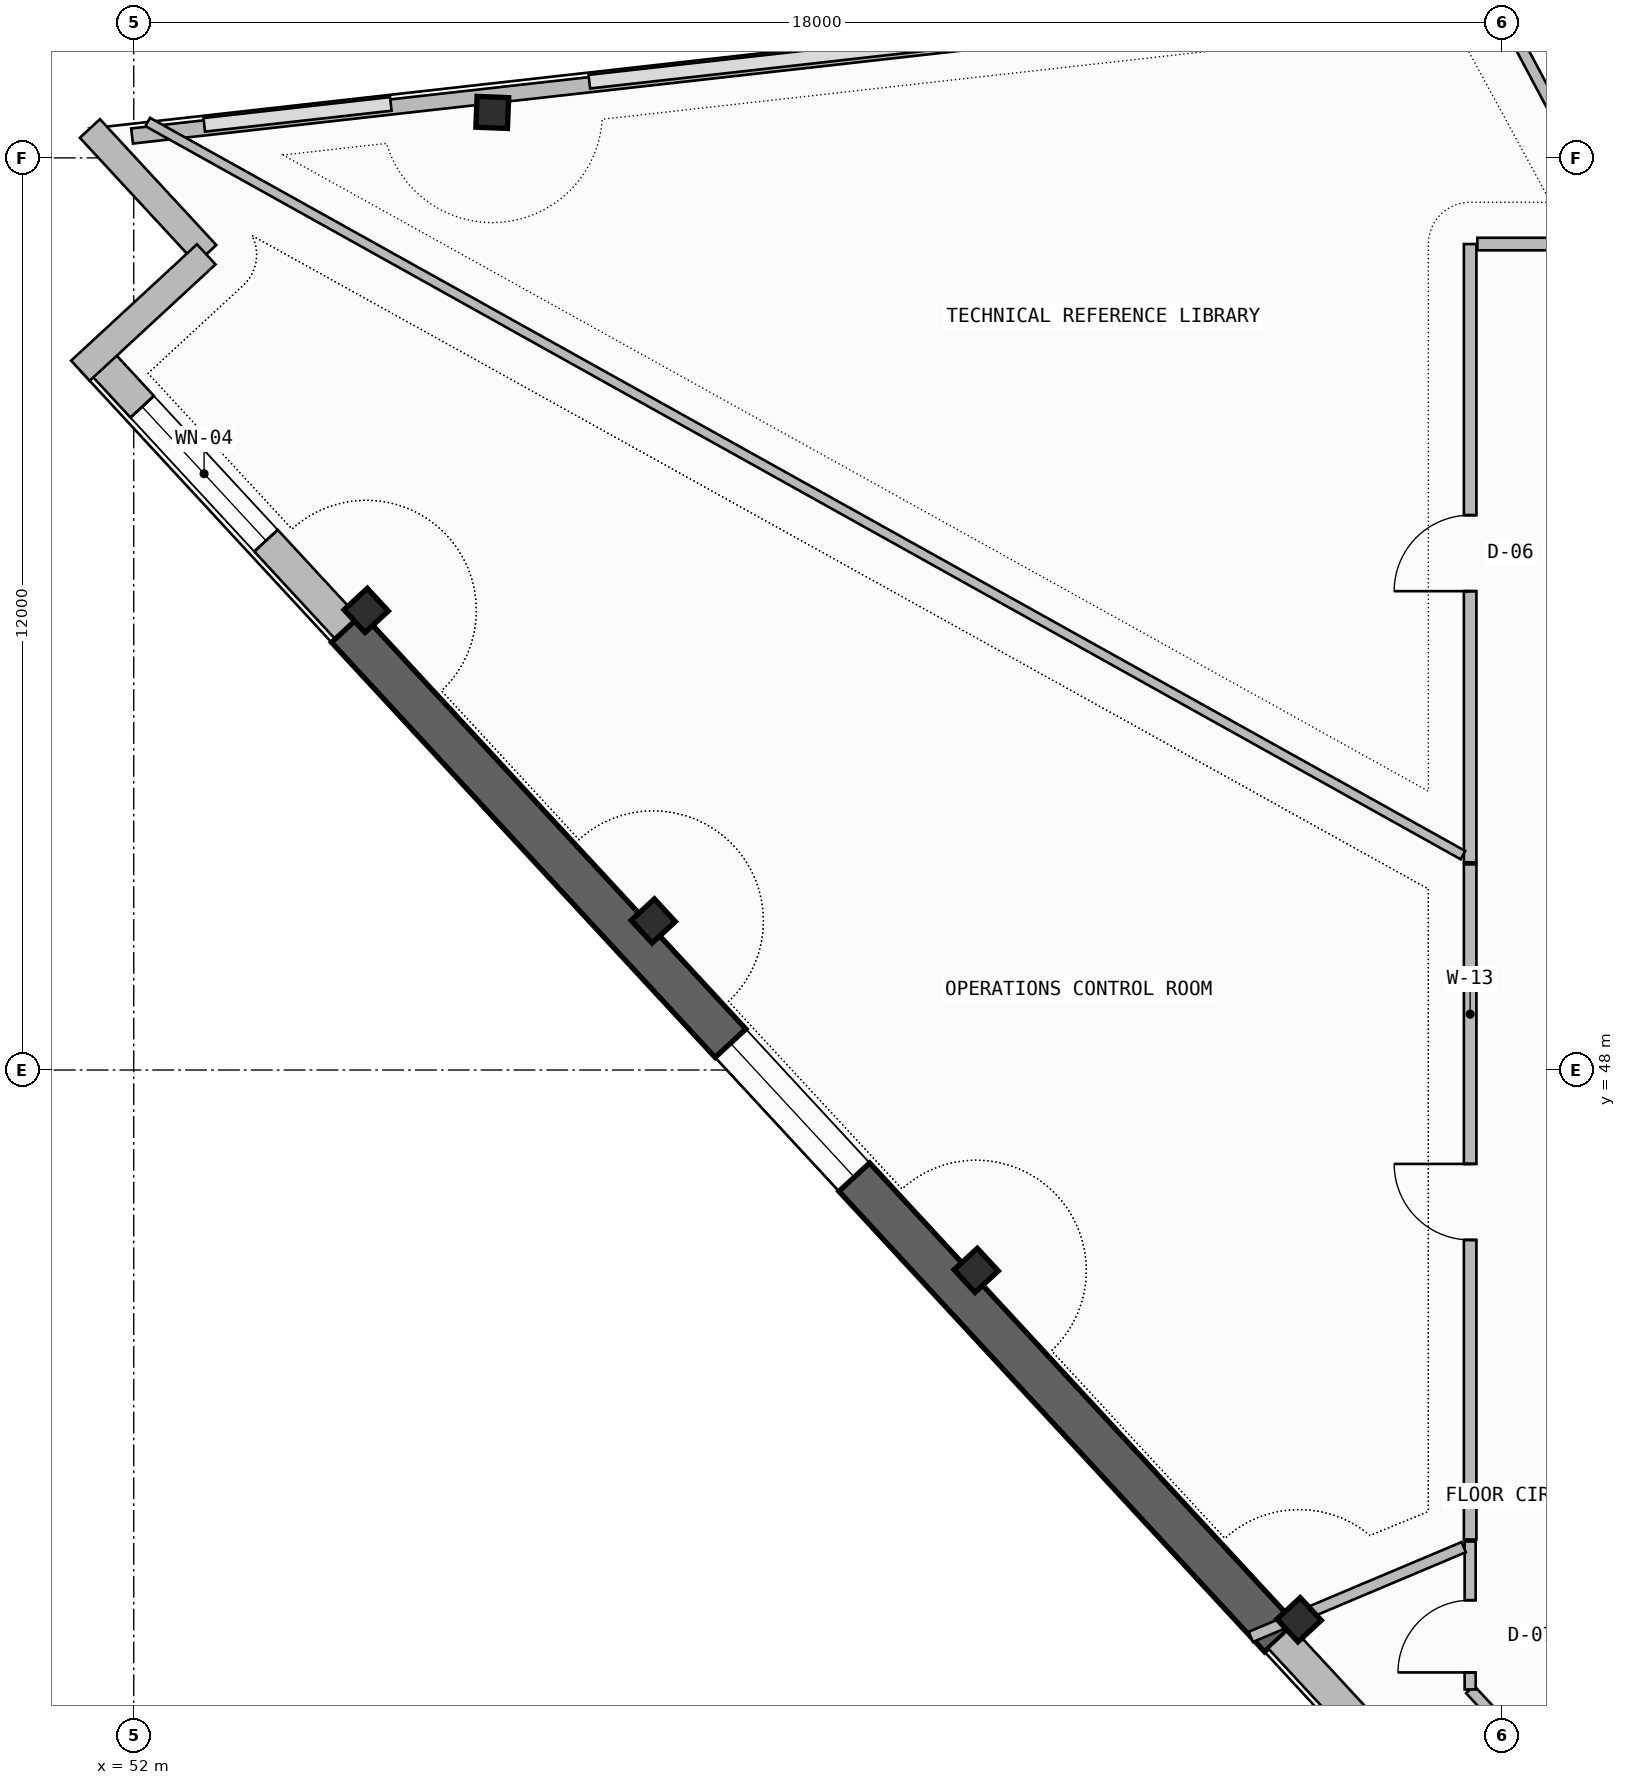
"""IFC4 building model, lengths in metres.
Left out: names, types, materials, properties, quantities, classifications, styles, units other than length and angle.
Written with IfcOpenShell. Run it as: python <this file> out.ifc"""

import sys

from ifc_helpers import new_model, si_unit, direction, frame, frame_2d, origin, origin_2d, place, context, subcontext, project, spatial, rectangle, i_section, extrude, element, fill, save


model = new_model("IFC4")
c1 = context("Model", 3, precision=1e-05, world=origin(), true_north=direction((0.0, 1.0)))
c2 = subcontext(c1, "Body", "Model", "MODEL_VIEW")
j1 = project(units=[si_unit("LENGTHUNIT", "METRE"), si_unit("PLANEANGLEUNIT", "RADIAN")], contexts=[c1])
p1 = place(None, origin())
s1 = spatial("IfcSite", under=j1, at=p1, CompositionType="ELEMENT")
p2 = place(p1, origin())
s2 = spatial("IfcBuilding", under=s1, at=p2, CompositionType="ELEMENT")
p3 = place(p2, frame((0.0, 0.0, 292.42)))
s3 = spatial("IfcBuildingStorey", under=s2, at=p3, CompositionType="ELEMENT", Elevation=292.42)
for number, where, z_axis, x_axis in (
    (1, (56.717, 60.598, 0.0), (0.0, 0.0, 1.0), (0.039, 0.999, 0.0)),
    (2, (55.058, 54.046, 0.0), (0.0, 0.0, 1.0), (-0.679, 0.734, 0.0)),
    (3, (58.835, 49.961, 0.0), (0.0, 0.0, 1.0), (-0.679, 0.734, 0.0)),
    (4, (63.084, 45.364, 0.0), (0.0, 0.0, 1.0), (-0.679, 0.734, 0.0)),
    (5, (67.333, 40.768, 0.0), (0.0, 0.0, 1.0), (-0.679, 0.734, 0.0)),
):
    element("IfcColumn", number, at=place(p3, frame(where, z_axis=z_axis, x_axis=x_axis)), inside=s3, PredefinedType="COLUMN", context=c2, shape_type="SweptSolid", body=[
        extrude(i_section(OverallWidth=0.406, OverallDepth=0.416, WebThickness=0.03, FlangeThickness=0.048, FilletRadius=0.015, at=origin_2d()), origin(), (0.0, 0.0, 1.0), 5.76),
    ])
p4 = place(p3, frame((51.5, 57.387, 0.0), z_axis=(0.0, 0.0, 1.0), x_axis=(0.67880684669, -0.734316869537, 0.0)))
e6 = element("IfcWall", 6, at=p4, inside=s3, PredefinedType="SOLIDWALL", context=c2, shape_type="SweptSolid", body=[
    extrude(rectangle(XDim=4.869, YDim=0.42, at=frame_2d((2.434, 0.0))), origin(), (0.0, 0.0, 1.0), 4.945),
])
p5 = place(p4, frame((0.9, 0.0, 1.1)))
e7 = element("IfcOpeningElement", 7, at=p5, cuts=e6, PredefinedType="OPENING", context=c2, shape_type="SweptSolid", body=[
    extrude(rectangle(XDim=2.4, YDim=1.2, at=frame_2d((1.2, 0.6))), frame((0.0, 0.22, 0.0), z_axis=(0.0, -1.0, 0.0), x_axis=(1.0, 0.0, 0.0)), (0.0, 0.0, 1.0), 0.44),
])
p6 = place(p3, frame((54.805, 53.812, -0.26), z_axis=(0.0, 0.0, 1.0), x_axis=(0.678803115619, -0.734320318543, 0.0)))
e8 = element("IfcWall", 8, at=p6, inside=s3, PredefinedType="SHEAR", context=c2, shape_type="SweptSolid", body=[
    extrude(rectangle(XDim=18.083, YDim=0.55, at=frame_2d((9.042, 0.0))), origin(), (0.0, 0.0, 1.0), 5.82),
])
p7 = place(p6, frame((7.434, 0.0, 1.1)))
e9 = element("IfcOpeningElement", 9, at=p7, cuts=e8, PredefinedType="OPENING", context=c2, shape_type="SweptSolid", body=[
    extrude(rectangle(XDim=2.4, YDim=1.2, at=frame_2d((1.2, 0.6))), frame((0.0, 0.285, 0.0), z_axis=(0.0, -1.0, 0.0), x_axis=(1.0, 0.0, 0.0)), (0.0, 0.0, 1.0), 0.57),
])
p8 = place(p3, frame((67.08, 40.533, 0.0), z_axis=(0.0, 0.0, 1.0), x_axis=(0.678800006437, -0.734323192648, 0.0)))
e10 = element("IfcWall", 10, at=p8, inside=s3, PredefinedType="SOLIDWALL", context=c2, shape_type="SweptSolid", body=[
    extrude(rectangle(XDim=6.512, YDim=0.42, at=frame_2d((3.256, 0.0))), origin(), (0.0, 0.0, 1.0), 4.945),
])
p9 = place(p8, frame((2.129, 0.0, 1.1)))
e11 = element("IfcOpeningElement", 11, at=p9, cuts=e10, PredefinedType="OPENING", context=c2, shape_type="SweptSolid", body=[
    extrude(rectangle(XDim=2.4, YDim=1.2, at=frame_2d((1.2, 0.6))), frame((0.0, 0.22, 0.0), z_axis=(0.0, -1.0, 0.0), x_axis=(1.0, 0.0, 0.0)), (0.0, 0.0, 1.0), 0.44),
])
for number, where, z_axis, x_axis in (
    (12, (51.423, 60.387, 0.0), (0.0, 0.0, 1.0), (0.679, -0.734, 0.0)),
    (13, (52.954, 58.731, 0.0), (0.0, 0.0, 1.0), (-0.734, -0.679, 0.0)),
):
    element("IfcWall", number, at=place(p3, frame(where, z_axis=z_axis, x_axis=x_axis)), inside=s3, PredefinedType="SOLIDWALL", context=c2, shape_type="SweptSolid", body=[
        extrude(rectangle(XDim=2.255, YDim=0.36, at=frame_2d((1.127, 0.0))), origin(), (0.0, 0.0, 1.0), 5.56),
    ])
p10 = place(p3, frame((81.557, 63.604, 0.0), z_axis=(0.0, 0.0, 1.0), x_axis=(-0.993775831398, -0.111398370403, 0.0)))
e14 = element("IfcWall", 14, at=p10, inside=s3, PredefinedType="PARAPET", context=c2, shape_type="SweptSolid", body=[
    extrude(rectangle(XDim=29.764, YDim=0.2, at=frame_2d((14.882, 0.0))), origin(), (0.0, 0.0, 1.0), 1.15),
])
p11 = place(p3, frame((69.583, 39.851, 0.0), z_axis=(0.0, 0.0, 1.0), x_axis=(0.678820916853, -0.734303862745, 0.0)))
e15 = element("IfcWall", 15, at=p11, inside=s3, PredefinedType="PARTITIONING", context=c2, shape_type="SweptSolid", body=[
    extrude(rectangle(XDim=2.455, YDim=0.145, at=frame_2d((1.228, 0.0))), origin(), (0.0, 0.0, 1.0), 5.56),
])
p12 = place(p3, frame((69.583, 41.798, 0.0), z_axis=(0.0, 0.0, 1.0), x_axis=(0.0, -1.0, 0.0)))
e16 = element("IfcWall", 16, at=p12, inside=s3, PredefinedType="PARTITIONING", context=c2, shape_type="SweptSolid", body=[
    extrude(rectangle(XDim=1.947, YDim=0.145, at=frame_2d((0.974, 0.0))), origin(), (0.0, 0.0, 1.0), 5.56),
])
p13 = place(p12, frame((0.773, 0.0, 0.0)))
e17 = element("IfcOpeningElement", 17, at=p13, cuts=e16, PredefinedType="OPENING", context=c2, shape_type="SweptSolid", body=[
    extrude(rectangle(XDim=0.95, YDim=2.15, at=frame_2d((0.475, 1.075))), frame((0.0, 0.083, 0.0), z_axis=(0.0, -1.0, 0.0), x_axis=(1.0, 0.0, 0.0)), (0.0, 0.0, 1.0), 0.165),
])
p14 = place(p3, frame((66.697, 40.542, 0.0), z_axis=(0.0, 0.0, 1.0), x_axis=(0.92147960716, 0.388426741598, 0.0)))
e18 = element("IfcWall", 18, at=p14, inside=s3, PredefinedType="PARTITIONING", context=c2, shape_type="SweptSolid", body=[
    extrude(rectangle(XDim=3.04, YDim=0.145, at=frame_2d((1.52, 0.0))), origin(), (0.0, 0.0, 1.0), 4.945),
])
p15 = place(p3, frame((71.589, 58.941, 0.0), z_axis=(0.0, 0.0, 1.0), x_axis=(-0.469769313207, 0.882789211742, 0.0)))
e19 = element("IfcWall", 19, at=p15, inside=s3, PredefinedType="PARTITIONING", context=c2, shape_type="SweptSolid", body=[
    extrude(rectangle(XDim=3.962, YDim=0.145, at=frame_2d((1.981, 0.0))), origin(), (0.0, 0.0, 1.0), 5.56),
])
p16 = place(p3, frame((69.583, 58.867, 0.0), z_axis=(0.0, 0.0, 1.0), x_axis=(0.0, -1.0, 0.0)))
e20 = element("IfcWall", 20, at=p16, inside=s3, PredefinedType="PARTITIONING", context=c2, shape_type="SweptSolid", body=[
    extrude(rectangle(XDim=8.134, YDim=0.165, at=frame_2d((4.067, 0.0))), origin(), (0.0, 0.0, 1.0), 5.045),
])
p17 = place(p16, frame((3.567, 0.0, 0.0)))
e21 = element("IfcOpeningElement", 21, at=p17, cuts=e20, PredefinedType="OPENING", context=c2, shape_type="SweptSolid", body=[
    extrude(rectangle(XDim=1.0, YDim=2.2, at=frame_2d((0.5, 1.1))), frame((0.0, 0.093, 0.0), z_axis=(0.0, -1.0, 0.0), x_axis=(1.0, 0.0, 0.0)), (0.0, 0.0, 1.0), 0.185),
])
p18 = place(p3, frame((71.499, 58.867, 0.0), z_axis=(0.0, 0.0, 1.0), x_axis=(-1.0, 0.0, 0.0)))
e22 = element("IfcWall", 22, at=p18, inside=s3, PredefinedType="PARTITIONING", context=c2, shape_type="SweptSolid", body=[
    extrude(rectangle(XDim=1.822, YDim=0.165, at=frame_2d((0.911, 0.0))), origin(), (0.0, 0.0, 1.0), 5.56),
])
p19 = place(p3, frame((69.489, 50.827, 0.0), z_axis=(0.0, 0.0, 1.0), x_axis=(-0.873486229604, 0.486848854053, 0.0)))
e23 = element("IfcWall", 23, at=p19, inside=s3, PredefinedType="PARTITIONING", context=c2, shape_type="SweptSolid", body=[
    extrude(rectangle(XDim=19.812, YDim=0.125, at=frame_2d((9.906, 0.0))), origin(), (0.0, 0.0, 1.0), 4.945),
])
p20 = place(p3, frame((69.583, 50.706, 0.0), z_axis=(0.0, 0.0, 1.0), x_axis=(0.0, -1.0, 0.0)))
e24 = element("IfcWall", 24, at=p20, inside=s3, PredefinedType="PARTITIONING", context=c2, shape_type="SweptSolid", body=[
    extrude(rectangle(XDim=8.882, YDim=0.165, at=frame_2d((4.441, 0.0))), origin(), (0.0, 0.0, 1.0), 5.045),
])
p21 = place(p20, frame((3.941, 0.0, 0.0)))
e25 = element("IfcOpeningElement", 25, at=p21, cuts=e24, PredefinedType="OPENING", context=c2, shape_type="SweptSolid", body=[
    extrude(rectangle(XDim=1.0, YDim=2.2, at=frame_2d((0.5, 1.1))), frame((0.0, 0.093, 0.0), z_axis=(0.0, -1.0, 0.0), x_axis=(1.0, 0.0, 0.0)), (0.0, 0.0, 1.0), 0.185),
])
p22 = place(p5, origin())
e26 = element("IfcWindow", 26, at=p22, inside=s3, PartitioningType="SINGLE_PANEL", PredefinedType="WINDOW", context=c2, shape_type="SweptSolid", body=[
    extrude(rectangle(XDim=2.4, YDim=1.2, at=frame_2d((1.2, 0.6))), frame((0.0, 0.03, 0.0), z_axis=(0.0, -1.0, 0.0), x_axis=(1.0, 0.0, 0.0)), (0.0, 0.0, 1.0), 0.06),
])
fill(e7, e26)
p23 = place(p7, origin())
e27 = element("IfcWindow", 27, at=p23, inside=s3, PartitioningType="SINGLE_PANEL", PredefinedType="WINDOW", context=c2, shape_type="SweptSolid", body=[
    extrude(rectangle(XDim=2.4, YDim=1.2, at=frame_2d((1.2, 0.6))), frame((0.0, 0.03, 0.0), z_axis=(0.0, -1.0, 0.0), x_axis=(1.0, 0.0, 0.0)), (0.0, 0.0, 1.0), 0.06),
])
fill(e9, e27)
p24 = place(p13, frame((0.95, 0.0, 0.0), z_axis=(0.0, 0.0, 1.0), x_axis=(-1.0, 0.0, 0.0)))
e28 = element("IfcDoor", 28, at=p24, inside=s3, OperationType="SINGLE_SWING_LEFT", PredefinedType="DOOR", context=c2, shape_type="SweptSolid", body=[
    extrude(rectangle(XDim=0.95, YDim=2.15, at=frame_2d((0.475, 1.075))), frame((0.0, 0.025, 0.0), z_axis=(0.0, -1.0, 0.0), x_axis=(1.0, 0.0, 0.0)), (0.0, 0.0, 1.0), 0.05),
])
fill(e17, e28)
p25 = place(p17, frame((1.0, 0.0, 0.0), z_axis=(0.0, 0.0, 1.0), x_axis=(-1.0, 0.0, 0.0)))
e29 = element("IfcDoor", 29, at=p25, inside=s3, OperationType="SINGLE_SWING_LEFT", PredefinedType="DOOR", context=c2, shape_type="SweptSolid", body=[
    extrude(rectangle(XDim=1.0, YDim=2.2, at=frame_2d((0.5, 1.1))), frame((0.0, 0.025, 0.0), z_axis=(0.0, -1.0, 0.0), x_axis=(1.0, 0.0, 0.0)), (0.0, 0.0, 1.0), 0.05),
])
fill(e21, e29)
p26 = place(p21, frame((1.0, 0.0, 0.0), z_axis=(0.0, 0.0, 1.0), x_axis=(-1.0, 0.0, 0.0)))
e30 = element("IfcDoor", 30, at=p26, inside=s3, OperationType="SINGLE_SWING_RIGHT", PredefinedType="DOOR", context=c2, shape_type="SweptSolid", body=[
    extrude(rectangle(XDim=1.0, YDim=2.2, at=frame_2d((0.5, 1.1))), frame((0.0, 0.025, 0.0), z_axis=(0.0, -1.0, 0.0), x_axis=(1.0, 0.0, 0.0)), (0.0, 0.0, 1.0), 0.05),
])
fill(e25, e30)
save(model, sys.argv[1])
